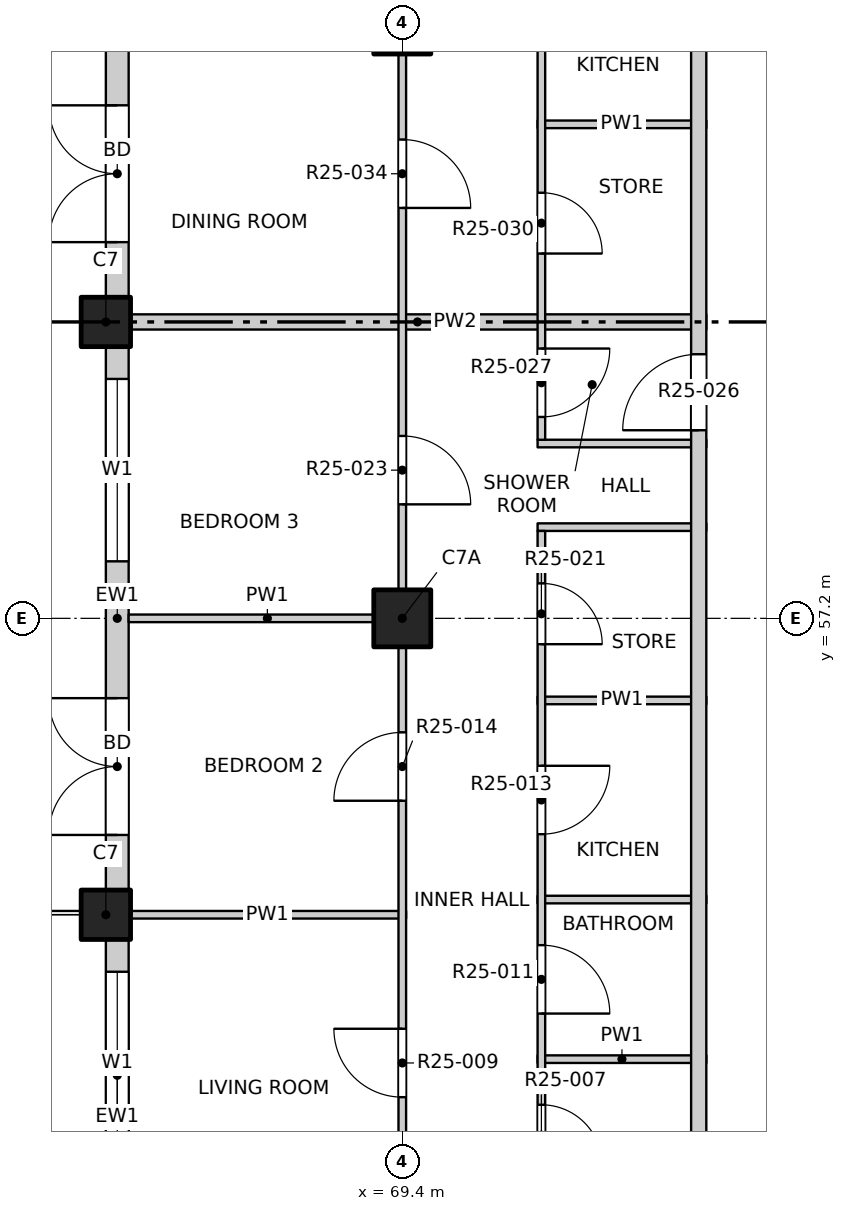
"""IFC4 building model, lengths in metres.
Left out: names, types, materials, properties, quantities, classifications, styles, units other than length and angle.
Written with IfcOpenShell. Run it as: python <this file> out.ifc"""

import sys

from ifc_helpers import new_model, si_unit, direction, frame, frame_2d, origin, origin_2d, place, context, subcontext, project, spatial, rectangle, extrude, element, fill, save


model = new_model("IFC4")
c1 = context("Model", 3, precision=1e-05, world=origin(), true_north=direction((0.0, 1.0)))
c2 = subcontext(c1, "Body", "Model", "MODEL_VIEW")
j1 = project(units=[si_unit("LENGTHUNIT", "METRE"), si_unit("PLANEANGLEUNIT", "RADIAN")], contexts=[c1])
p1 = place(None, origin())
s1 = spatial("IfcSite", under=j1, at=p1, CompositionType="ELEMENT")
p2 = place(p1, origin())
s2 = spatial("IfcBuilding", under=s1, at=p2, CompositionType="ELEMENT")
p3 = place(p2, frame((0.0, 0.0, 252.8)))
s3 = spatial("IfcBuildingStorey", under=s2, at=p3, CompositionType="ELEMENT", Elevation=252.8)
for number, where, z_axis, x_axis in (
    (1, (65.5, 53.3, -0.25), (0.0, 0.0, 1.0), (1.0, 0.0, 0.0)),
    (2, (65.5, 61.1, -0.25), (0.0, 0.0, 1.0), (1.0, 0.0, 0.0)),
):
    element("IfcColumn", number, at=place(p3, frame(where, z_axis=z_axis, x_axis=x_axis)), inside=s3, PredefinedType="COLUMN", context=c2, shape_type="SweptSolid", body=[
        extrude(rectangle(XDim=0.65, YDim=0.65, at=origin_2d()), origin(), (0.0, 0.0, 1.0), 3.4),
    ])
for number, where, z_axis, x_axis in (
    (3, (69.4, 57.2, -0.25), (0.0, 0.0, 1.0), (1.0, 0.0, 0.0)),
    (4, (69.4, 65.0, -0.25), (0.0, 0.0, 1.0), (1.0, 0.0, 0.0)),
):
    element("IfcColumn", number, at=place(p3, frame(where, z_axis=z_axis, x_axis=x_axis)), inside=s3, PredefinedType="COLUMN", context=c2, shape_type="SweptSolid", body=[
        extrude(rectangle(XDim=0.75, YDim=0.75, at=origin_2d()), origin(), (0.0, 0.0, 1.0), 3.4),
    ])
p4 = place(p3, frame((65.65, 49.4, 0.0), z_axis=(0.0, 0.0, 1.0), x_axis=(0.0, 1.0, 0.0)))
e5 = element("IfcWall", 5, at=p4, inside=s3, PredefinedType="SOLIDWALL", context=c2, shape_type="SweptSolid", body=[
    extrude(rectangle(XDim=3.575, YDim=0.3, at=frame_2d((1.788, 0.0))), origin(), (0.0, 0.0, 1.0), 2.7),
])
p5 = place(p4, frame((0.75, 0.0, 0.9)))
e6 = element("IfcOpeningElement", 6, at=p5, cuts=e5, PredefinedType="OPENING", context=c2, shape_type="SweptSolid", body=[
    extrude(rectangle(XDim=2.4, YDim=1.8, at=frame_2d((1.2, 0.9))), frame((0.0, 0.16, 0.0), z_axis=(0.0, -1.0, 0.0), x_axis=(1.0, 0.0, 0.0)), (0.0, 0.0, 1.0), 0.32),
])
p6 = place(p3, frame((65.65, 53.625, 0.0), z_axis=(0.0, 0.0, 1.0), x_axis=(0.0, 1.0, 0.0)))
e7 = element("IfcWall", 7, at=p6, inside=s3, PredefinedType="SOLIDWALL", context=c2, shape_type="SweptSolid", body=[
    extrude(rectangle(XDim=7.15, YDim=0.3, at=frame_2d((3.575, 0.0))), origin(), (0.0, 0.0, 1.0), 2.7),
])
p7 = place(p6, frame((0.725, 0.0, 0.0)))
e8 = element("IfcOpeningElement", 8, at=p7, cuts=e7, PredefinedType="OPENING", context=c2, shape_type="SweptSolid", body=[
    extrude(rectangle(XDim=1.8, YDim=2.4, at=frame_2d((0.9, 1.2))), frame((0.0, 0.16, 0.0), z_axis=(0.0, -1.0, 0.0), x_axis=(1.0, 0.0, 0.0)), (0.0, 0.0, 1.0), 0.32),
])
p8 = place(p6, frame((4.325, 0.0, 0.9)))
e9 = element("IfcOpeningElement", 9, at=p8, cuts=e7, PredefinedType="OPENING", context=c2, shape_type="SweptSolid", body=[
    extrude(rectangle(XDim=2.4, YDim=1.8, at=frame_2d((1.2, 0.9))), frame((0.0, 0.16, 0.0), z_axis=(0.0, -1.0, 0.0), x_axis=(1.0, 0.0, 0.0)), (0.0, 0.0, 1.0), 0.32),
])
p9 = place(p3, frame((65.65, 61.425, 0.0), z_axis=(0.0, 0.0, 1.0), x_axis=(0.0, 1.0, 0.0)))
e10 = element("IfcWall", 10, at=p9, inside=s3, PredefinedType="SOLIDWALL", context=c2, shape_type="SweptSolid", body=[
    extrude(rectangle(XDim=7.15, YDim=0.3, at=frame_2d((3.575, 0.0))), origin(), (0.0, 0.0, 1.0), 2.7),
])
p10 = place(p9, frame((0.725, 0.0, 0.0)))
e11 = element("IfcOpeningElement", 11, at=p10, cuts=e10, PredefinedType="OPENING", context=c2, shape_type="SweptSolid", body=[
    extrude(rectangle(XDim=1.8, YDim=2.4, at=frame_2d((0.9, 1.2))), frame((0.0, 0.16, 0.0), z_axis=(0.0, -1.0, 0.0), x_axis=(1.0, 0.0, 0.0)), (0.0, 0.0, 1.0), 0.32),
])
p11 = place(p9, frame((4.325, 0.0, 0.9)))
e12 = element("IfcOpeningElement", 12, at=p11, cuts=e10, PredefinedType="OPENING", context=c2, shape_type="SweptSolid", body=[
    extrude(rectangle(XDim=2.4, YDim=1.8, at=frame_2d((1.2, 0.9))), frame((0.0, 0.16, 0.0), z_axis=(0.0, -1.0, 0.0), x_axis=(1.0, 0.0, 0.0)), (0.0, 0.0, 1.0), 0.32),
])
p12 = place(p3, frame((71.18, 51.4, 0.0), z_axis=(0.0, 0.0, 1.0), x_axis=(1.0, 0.0, 0.0)))
e13 = element("IfcWall", 13, at=p12, inside=s3, PredefinedType="PARTITIONING", context=c2, shape_type="SweptSolid", body=[
    extrude(rectangle(XDim=2.22, YDim=0.1, at=frame_2d((1.11, 0.0))), origin(), (0.0, 0.0, 1.0), 3.15),
])
p13 = place(p3, frame((65.8, 53.3, 0.0), z_axis=(0.0, 0.0, 1.0), x_axis=(1.0, 0.0, 0.0)))
e14 = element("IfcWall", 14, at=p13, inside=s3, PredefinedType="PARTITIONING", context=c2, shape_type="SweptSolid", body=[
    extrude(rectangle(XDim=3.65, YDim=0.1, at=frame_2d((1.825, 0.0))), origin(), (0.0, 0.0, 1.0), 3.15),
])
for number, where, z_axis, x_axis in (
    (15, (71.18, 53.5, 0.0), (0.0, 0.0, 1.0), (1.0, 0.0, 0.0)),
    (16, (71.18, 56.12, 0.0), (0.0, 0.0, 1.0), (1.0, 0.0, 0.0)),
):
    element("IfcWall", number, at=place(p3, frame(where, z_axis=z_axis, x_axis=x_axis)), inside=s3, PredefinedType="PARTITIONING", context=c2, shape_type="SweptSolid", body=[
        extrude(rectangle(XDim=2.22, YDim=0.1, at=frame_2d((1.11, 0.0))), origin(), (0.0, 0.0, 1.0), 3.15),
    ])
p14 = place(p3, frame((65.8, 57.2, 0.0), z_axis=(0.0, 0.0, 1.0), x_axis=(1.0, 0.0, 0.0)))
e17 = element("IfcWall", 17, at=p14, inside=s3, PredefinedType="PARTITIONING", context=c2, shape_type="SweptSolid", body=[
    extrude(rectangle(XDim=3.65, YDim=0.1, at=frame_2d((1.825, 0.0))), origin(), (0.0, 0.0, 1.0), 3.15),
])
for number, where, z_axis, x_axis in (
    (18, (71.18, 58.4, 0.0), (0.0, 0.0, 1.0), (1.0, 0.0, 0.0)),
    (19, (71.18, 59.5, 0.0), (0.0, 0.0, 1.0), (1.0, 0.0, 0.0)),
):
    element("IfcWall", number, at=place(p3, frame(where, z_axis=z_axis, x_axis=x_axis)), inside=s3, PredefinedType="PARTITIONING", context=c2, shape_type="SweptSolid", body=[
        extrude(rectangle(XDim=2.22, YDim=0.1, at=frame_2d((1.11, 0.0))), origin(), (0.0, 0.0, 1.0), 3.15),
    ])
p15 = place(p3, frame((65.8, 61.1, 0.0), z_axis=(0.0, 0.0, 1.0), x_axis=(1.0, 0.0, 0.0)))
e20 = element("IfcWall", 20, at=p15, inside=s3, PredefinedType="PARTITIONING", context=c2, shape_type="SweptSolid", body=[
    extrude(rectangle(XDim=7.6, YDim=0.2, at=frame_2d((3.8, 0.0))), origin(), (0.0, 0.0, 1.0), 2.55),
])
p16 = place(p3, frame((71.18, 63.7, 0.0), z_axis=(0.0, 0.0, 1.0), x_axis=(1.0, 0.0, 0.0)))
e21 = element("IfcWall", 21, at=p16, inside=s3, PredefinedType="PARTITIONING", context=c2, shape_type="SweptSolid", body=[
    extrude(rectangle(XDim=2.22, YDim=0.1, at=frame_2d((1.11, 0.0))), origin(), (0.0, 0.0, 1.0), 3.15),
])
p17 = place(p3, frame((69.4, 45.8, 0.0), z_axis=(0.0, 0.0, 1.0), x_axis=(0.0, 1.0, 0.0)))
e22 = element("IfcWall", 22, at=p17, inside=s3, PredefinedType="PARTITIONING", context=c2, shape_type="SweptSolid", body=[
    extrude(rectangle(XDim=38.4, YDim=0.1, at=frame_2d((19.2, 0.0))), origin(), (0.0, 0.0, 1.0), 3.15),
])
p18 = place(p17, frame((1.05, 0.0, 0.0)))
e23 = element("IfcOpeningElement", 23, at=p18, cuts=e22, PredefinedType="OPENING", context=c2, shape_type="SweptSolid", body=[
    extrude(rectangle(XDim=1.2, YDim=2.1, at=frame_2d((0.6, 1.05))), frame((0.0, 0.06, 0.0), z_axis=(0.0, -1.0, 0.0), x_axis=(1.0, 0.0, 0.0)), (0.0, 0.0, 1.0), 0.12),
])
p19 = place(p17, frame((5.1, 0.0, 0.0)))
e24 = element("IfcOpeningElement", 24, at=p19, cuts=e22, PredefinedType="OPENING", context=c2, shape_type="SweptSolid", body=[
    extrude(rectangle(XDim=0.9, YDim=2.1, at=frame_2d((0.45, 1.05))), frame((0.0, 0.06, 0.0), z_axis=(0.0, -1.0, 0.0), x_axis=(1.0, 0.0, 0.0)), (0.0, 0.0, 1.0), 0.12),
])
p20 = place(p17, frame((9.0, 0.0, 0.0)))
e25 = element("IfcOpeningElement", 25, at=p20, cuts=e22, PredefinedType="OPENING", context=c2, shape_type="SweptSolid", body=[
    extrude(rectangle(XDim=0.9, YDim=2.1, at=frame_2d((0.45, 1.05))), frame((0.0, 0.06, 0.0), z_axis=(0.0, -1.0, 0.0), x_axis=(1.0, 0.0, 0.0)), (0.0, 0.0, 1.0), 0.12),
])
p21 = place(p17, frame((12.9, 0.0, 0.0)))
e26 = element("IfcOpeningElement", 26, at=p21, cuts=e22, PredefinedType="OPENING", context=c2, shape_type="SweptSolid", body=[
    extrude(rectangle(XDim=0.9, YDim=2.1, at=frame_2d((0.45, 1.05))), frame((0.0, 0.06, 0.0), z_axis=(0.0, -1.0, 0.0), x_axis=(1.0, 0.0, 0.0)), (0.0, 0.0, 1.0), 0.12),
])
p22 = place(p17, frame((16.8, 0.0, 0.0)))
e27 = element("IfcOpeningElement", 27, at=p22, cuts=e22, PredefinedType="OPENING", context=c2, shape_type="SweptSolid", body=[
    extrude(rectangle(XDim=0.9, YDim=2.1, at=frame_2d((0.45, 1.05))), frame((0.0, 0.06, 0.0), z_axis=(0.0, -1.0, 0.0), x_axis=(1.0, 0.0, 0.0)), (0.0, 0.0, 1.0), 0.12),
])
p23 = place(p17, frame((20.7, 0.0, 0.0)))
e28 = element("IfcOpeningElement", 28, at=p23, cuts=e22, PredefinedType="OPENING", context=c2, shape_type="SweptSolid", body=[
    extrude(rectangle(XDim=0.9, YDim=2.1, at=frame_2d((0.45, 1.05))), frame((0.0, 0.06, 0.0), z_axis=(0.0, -1.0, 0.0), x_axis=(1.0, 0.0, 0.0)), (0.0, 0.0, 1.0), 0.12),
])
p24 = place(p17, frame((24.6, 0.0, 0.0)))
e29 = element("IfcOpeningElement", 29, at=p24, cuts=e22, PredefinedType="OPENING", context=c2, shape_type="SweptSolid", body=[
    extrude(rectangle(XDim=0.9, YDim=2.1, at=frame_2d((0.45, 1.05))), frame((0.0, 0.06, 0.0), z_axis=(0.0, -1.0, 0.0), x_axis=(1.0, 0.0, 0.0)), (0.0, 0.0, 1.0), 0.12),
])
p25 = place(p17, frame((28.5, 0.0, 0.0)))
e30 = element("IfcOpeningElement", 30, at=p25, cuts=e22, PredefinedType="OPENING", context=c2, shape_type="SweptSolid", body=[
    extrude(rectangle(XDim=0.9, YDim=2.1, at=frame_2d((0.45, 1.05))), frame((0.0, 0.06, 0.0), z_axis=(0.0, -1.0, 0.0), x_axis=(1.0, 0.0, 0.0)), (0.0, 0.0, 1.0), 0.12),
])
p26 = place(p17, frame((32.4, 0.0, 0.0)))
e31 = element("IfcOpeningElement", 31, at=p26, cuts=e22, PredefinedType="OPENING", context=c2, shape_type="SweptSolid", body=[
    extrude(rectangle(XDim=0.9, YDim=2.1, at=frame_2d((0.45, 1.05))), frame((0.0, 0.06, 0.0), z_axis=(0.0, -1.0, 0.0), x_axis=(1.0, 0.0, 0.0)), (0.0, 0.0, 1.0), 0.12),
])
p27 = place(p17, frame((36.15, 0.0, 0.0)))
e32 = element("IfcOpeningElement", 32, at=p27, cuts=e22, PredefinedType="OPENING", context=c2, shape_type="SweptSolid", body=[
    extrude(rectangle(XDim=1.2, YDim=2.1, at=frame_2d((0.6, 1.05))), frame((0.0, 0.06, 0.0), z_axis=(0.0, -1.0, 0.0), x_axis=(1.0, 0.0, 0.0)), (0.0, 0.0, 1.0), 0.12),
])
p28 = place(p3, frame((71.23, 49.45, 0.0), z_axis=(0.0, 0.0, 1.0), x_axis=(0.0, 1.0, 0.0)))
e33 = element("IfcWall", 33, at=p28, inside=s3, PredefinedType="PARTITIONING", context=c2, shape_type="SweptSolid", body=[
    extrude(rectangle(XDim=8.9, YDim=0.1, at=frame_2d((4.45, 0.0))), origin(), (0.0, 0.0, 1.0), 3.15),
])
p29 = place(p28, frame((0.55, 0.0, 0.0)))
e34 = element("IfcOpeningElement", 34, at=p29, cuts=e33, PredefinedType="OPENING", context=c2, shape_type="SweptSolid", body=[
    extrude(rectangle(XDim=0.8, YDim=2.1, at=frame_2d((0.4, 1.05))), frame((0.0, 0.06, 0.0), z_axis=(0.0, -1.0, 0.0), x_axis=(1.0, 0.0, 0.0)), (0.0, 0.0, 1.0), 0.12),
])
p30 = place(p28, frame((2.55, 0.0, 0.0)))
e35 = element("IfcOpeningElement", 35, at=p30, cuts=e33, PredefinedType="OPENING", context=c2, shape_type="SweptSolid", body=[
    extrude(rectangle(XDim=0.9, YDim=2.1, at=frame_2d((0.45, 1.05))), frame((0.0, 0.06, 0.0), z_axis=(0.0, -1.0, 0.0), x_axis=(1.0, 0.0, 0.0)), (0.0, 0.0, 1.0), 0.12),
])
p31 = place(p28, frame((4.91, 0.0, 0.0)))
e36 = element("IfcOpeningElement", 36, at=p31, cuts=e33, PredefinedType="OPENING", context=c2, shape_type="SweptSolid", body=[
    extrude(rectangle(XDim=0.9, YDim=2.1, at=frame_2d((0.45, 1.05))), frame((0.0, 0.06, 0.0), z_axis=(0.0, -1.0, 0.0), x_axis=(1.0, 0.0, 0.0)), (0.0, 0.0, 1.0), 0.12),
])
p32 = place(p28, frame((7.41, 0.0, 0.0)))
e37 = element("IfcOpeningElement", 37, at=p32, cuts=e33, PredefinedType="OPENING", context=c2, shape_type="SweptSolid", body=[
    extrude(rectangle(XDim=0.8, YDim=2.1, at=frame_2d((0.4, 1.05))), frame((0.0, 0.06, 0.0), z_axis=(0.0, -1.0, 0.0), x_axis=(1.0, 0.0, 0.0)), (0.0, 0.0, 1.0), 0.12),
])
p33 = place(p3, frame((71.23, 59.55, 0.0), z_axis=(0.0, 0.0, 1.0), x_axis=(0.0, 1.0, 0.0)))
e38 = element("IfcWall", 38, at=p33, inside=s3, PredefinedType="PARTITIONING", context=c2, shape_type="SweptSolid", body=[
    extrude(rectangle(XDim=10.1, YDim=0.1, at=frame_2d((5.05, 0.0))), origin(), (0.0, 0.0, 1.0), 3.15),
])
p34 = place(p33, frame((0.3, 0.0, 0.0)))
e39 = element("IfcOpeningElement", 39, at=p34, cuts=e38, PredefinedType="OPENING", context=c2, shape_type="SweptSolid", body=[
    extrude(rectangle(XDim=0.9, YDim=2.1, at=frame_2d((0.45, 1.05))), frame((0.0, 0.06, 0.0), z_axis=(0.0, -1.0, 0.0), x_axis=(1.0, 0.0, 0.0)), (0.0, 0.0, 1.0), 0.12),
])
p35 = place(p33, frame((2.45, 0.0, 0.0)))
e40 = element("IfcOpeningElement", 40, at=p35, cuts=e38, PredefinedType="OPENING", context=c2, shape_type="SweptSolid", body=[
    extrude(rectangle(XDim=0.8, YDim=2.1, at=frame_2d((0.4, 1.05))), frame((0.0, 0.06, 0.0), z_axis=(0.0, -1.0, 0.0), x_axis=(1.0, 0.0, 0.0)), (0.0, 0.0, 1.0), 0.12),
])
p36 = place(p33, frame((5.31, 0.0, 0.0)))
e41 = element("IfcOpeningElement", 41, at=p36, cuts=e38, PredefinedType="OPENING", context=c2, shape_type="SweptSolid", body=[
    extrude(rectangle(XDim=0.9, YDim=2.1, at=frame_2d((0.45, 1.05))), frame((0.0, 0.06, 0.0), z_axis=(0.0, -1.0, 0.0), x_axis=(1.0, 0.0, 0.0)), (0.0, 0.0, 1.0), 0.12),
])
p37 = place(p33, frame((8.36, 0.0, 0.0)))
e42 = element("IfcOpeningElement", 42, at=p37, cuts=e38, PredefinedType="OPENING", context=c2, shape_type="SweptSolid", body=[
    extrude(rectangle(XDim=0.8, YDim=2.1, at=frame_2d((0.4, 1.05))), frame((0.0, 0.06, 0.0), z_axis=(0.0, -1.0, 0.0), x_axis=(1.0, 0.0, 0.0)), (0.0, 0.0, 1.0), 0.12),
])
p38 = place(p3, frame((73.3, 49.5, 0.0), z_axis=(0.0, 0.0, 1.0), x_axis=(0.0, 1.0, 0.0)))
e43 = element("IfcWall", 43, at=p38, inside=s3, PredefinedType="PARTITIONING", context=c2, shape_type="SweptSolid", body=[
    extrude(rectangle(XDim=34.7, YDim=0.2, at=frame_2d((17.35, 0.0))), origin(), (0.0, 0.0, 1.0), 3.15),
])
p39 = place(p38, frame((10.175, 0.0, 0.0)))
e44 = element("IfcOpeningElement", 44, at=p39, cuts=e43, PredefinedType="OPENING", context=c2, shape_type="SweptSolid", body=[
    extrude(rectangle(XDim=1.0, YDim=2.1, at=frame_2d((0.5, 1.05))), frame((0.0, 0.11, 0.0), z_axis=(0.0, -1.0, 0.0), x_axis=(1.0, 0.0, 0.0)), (0.0, 0.0, 1.0), 0.22),
])
p40 = place(p38, frame((21.475, 0.0, 0.0)))
e45 = element("IfcOpeningElement", 45, at=p40, cuts=e43, PredefinedType="OPENING", context=c2, shape_type="SweptSolid", body=[
    extrude(rectangle(XDim=1.0, YDim=2.1, at=frame_2d((0.5, 1.05))), frame((0.0, 0.11, 0.0), z_axis=(0.0, -1.0, 0.0), x_axis=(1.0, 0.0, 0.0)), (0.0, 0.0, 1.0), 0.22),
])
p41 = place(p38, frame((29.875, 0.0, 0.0)))
e46 = element("IfcOpeningElement", 46, at=p41, cuts=e43, PredefinedType="OPENING", context=c2, shape_type="SweptSolid", body=[
    extrude(rectangle(XDim=1.0, YDim=2.1, at=frame_2d((0.5, 1.05))), frame((0.0, 0.11, 0.0), z_axis=(0.0, -1.0, 0.0), x_axis=(1.0, 0.0, 0.0)), (0.0, 0.0, 1.0), 0.22),
])
p42 = place(p5, origin())
e47 = element("IfcWindow", 47, at=p42, inside=s3, PartitioningType="DOUBLE_PANEL_VERTICAL", PredefinedType="WINDOW", context=c2, shape_type="SweptSolid", body=[
    extrude(rectangle(XDim=2.4, YDim=1.8, at=frame_2d((1.2, 0.9))), frame((0.0, 0.03, 0.0), z_axis=(0.0, -1.0, 0.0), x_axis=(1.0, 0.0, 0.0)), (0.0, 0.0, 1.0), 0.06),
])
fill(e6, e47)
p43 = place(p7, origin())
e48 = element("IfcDoor", 48, at=p43, inside=s3, OperationType="DOUBLE_DOOR_SINGLE_SWING", PredefinedType="DOOR", context=c2, shape_type="SweptSolid", body=[
    extrude(rectangle(XDim=1.8, YDim=2.4, at=frame_2d((0.9, 1.2))), frame((0.0, 0.025, 0.0), z_axis=(0.0, -1.0, 0.0), x_axis=(1.0, 0.0, 0.0)), (0.0, 0.0, 1.0), 0.05),
])
fill(e8, e48)
p44 = place(p8, origin())
e49 = element("IfcWindow", 49, at=p44, inside=s3, PartitioningType="DOUBLE_PANEL_VERTICAL", PredefinedType="WINDOW", context=c2, shape_type="SweptSolid", body=[
    extrude(rectangle(XDim=2.4, YDim=1.8, at=frame_2d((1.2, 0.9))), frame((0.0, 0.03, 0.0), z_axis=(0.0, -1.0, 0.0), x_axis=(1.0, 0.0, 0.0)), (0.0, 0.0, 1.0), 0.06),
])
fill(e9, e49)
p45 = place(p10, origin())
e50 = element("IfcDoor", 50, at=p45, inside=s3, OperationType="DOUBLE_DOOR_SINGLE_SWING", PredefinedType="DOOR", context=c2, shape_type="SweptSolid", body=[
    extrude(rectangle(XDim=1.8, YDim=2.4, at=frame_2d((0.9, 1.2))), frame((0.0, 0.025, 0.0), z_axis=(0.0, -1.0, 0.0), x_axis=(1.0, 0.0, 0.0)), (0.0, 0.0, 1.0), 0.05),
])
fill(e11, e50)
p46 = place(p29, origin())
e51 = element("IfcDoor", 51, at=p46, inside=s3, OperationType="SINGLE_SWING_RIGHT", PredefinedType="DOOR", context=c2, shape_type="SweptSolid", body=[
    extrude(rectangle(XDim=0.8, YDim=2.1, at=frame_2d((0.4, 1.05))), frame((0.0, 0.025, 0.0), z_axis=(0.0, -1.0, 0.0), x_axis=(1.0, 0.0, 0.0)), (0.0, 0.0, 1.0), 0.05),
])
fill(e34, e51)
p47 = place(p19, origin())
e52 = element("IfcDoor", 52, at=p47, inside=s3, OperationType="SINGLE_SWING_RIGHT", PredefinedType="DOOR", context=c2, shape_type="SweptSolid", body=[
    extrude(rectangle(XDim=0.9, YDim=2.1, at=frame_2d((0.45, 1.05))), frame((0.0, 0.025, 0.0), z_axis=(0.0, -1.0, 0.0), x_axis=(1.0, 0.0, 0.0)), (0.0, 0.0, 1.0), 0.05),
])
fill(e24, e52)
p48 = place(p30, origin())
e53 = element("IfcDoor", 53, at=p48, inside=s3, OperationType="SINGLE_SWING_RIGHT", PredefinedType="DOOR", context=c2, shape_type="SweptSolid", body=[
    extrude(rectangle(XDim=0.9, YDim=2.1, at=frame_2d((0.45, 1.05))), frame((0.0, 0.025, 0.0), z_axis=(0.0, -1.0, 0.0), x_axis=(1.0, 0.0, 0.0)), (0.0, 0.0, 1.0), 0.05),
])
fill(e35, e53)
p49 = place(p31, origin())
e54 = element("IfcDoor", 54, at=p49, inside=s3, OperationType="SINGLE_SWING_LEFT", PredefinedType="DOOR", context=c2, shape_type="SweptSolid", body=[
    extrude(rectangle(XDim=0.9, YDim=2.1, at=frame_2d((0.45, 1.05))), frame((0.0, 0.025, 0.0), z_axis=(0.0, -1.0, 0.0), x_axis=(1.0, 0.0, 0.0)), (0.0, 0.0, 1.0), 0.05),
])
fill(e36, e54)
p50 = place(p20, origin())
e55 = element("IfcDoor", 55, at=p50, inside=s3, OperationType="SINGLE_SWING_LEFT", PredefinedType="DOOR", context=c2, shape_type="SweptSolid", body=[
    extrude(rectangle(XDim=0.9, YDim=2.1, at=frame_2d((0.45, 1.05))), frame((0.0, 0.025, 0.0), z_axis=(0.0, -1.0, 0.0), x_axis=(1.0, 0.0, 0.0)), (0.0, 0.0, 1.0), 0.05),
])
fill(e25, e55)
p51 = place(p32, origin())
e56 = element("IfcDoor", 56, at=p51, inside=s3, OperationType="SINGLE_SWING_RIGHT", PredefinedType="DOOR", context=c2, shape_type="SweptSolid", body=[
    extrude(rectangle(XDim=0.8, YDim=2.1, at=frame_2d((0.4, 1.05))), frame((0.0, 0.025, 0.0), z_axis=(0.0, -1.0, 0.0), x_axis=(1.0, 0.0, 0.0)), (0.0, 0.0, 1.0), 0.05),
])
fill(e37, e56)
p52 = place(p21, origin())
e57 = element("IfcDoor", 57, at=p52, inside=s3, OperationType="SINGLE_SWING_RIGHT", PredefinedType="DOOR", context=c2, shape_type="SweptSolid", body=[
    extrude(rectangle(XDim=0.9, YDim=2.1, at=frame_2d((0.45, 1.05))), frame((0.0, 0.025, 0.0), z_axis=(0.0, -1.0, 0.0), x_axis=(1.0, 0.0, 0.0)), (0.0, 0.0, 1.0), 0.05),
])
fill(e26, e57)
p53 = place(p39, origin())
e58 = element("IfcDoor", 58, at=p53, inside=s3, OperationType="SINGLE_SWING_RIGHT", PredefinedType="DOOR", context=c2, shape_type="SweptSolid", body=[
    extrude(rectangle(XDim=1.0, YDim=2.1, at=frame_2d((0.5, 1.05))), frame((0.0, 0.025, 0.0), z_axis=(0.0, -1.0, 0.0), x_axis=(1.0, 0.0, 0.0)), (0.0, 0.0, 1.0), 0.05),
])
fill(e44, e58)
p54 = place(p34, origin())
e59 = element("IfcDoor", 59, at=p54, inside=s3, OperationType="SINGLE_SWING_LEFT", PredefinedType="DOOR", context=c2, shape_type="SweptSolid", body=[
    extrude(rectangle(XDim=0.9, YDim=2.1, at=frame_2d((0.45, 1.05))), frame((0.0, 0.025, 0.0), z_axis=(0.0, -1.0, 0.0), x_axis=(1.0, 0.0, 0.0)), (0.0, 0.0, 1.0), 0.05),
])
fill(e39, e59)
p55 = place(p35, origin())
e60 = element("IfcDoor", 60, at=p55, inside=s3, OperationType="SINGLE_SWING_RIGHT", PredefinedType="DOOR", context=c2, shape_type="SweptSolid", body=[
    extrude(rectangle(XDim=0.8, YDim=2.1, at=frame_2d((0.4, 1.05))), frame((0.0, 0.025, 0.0), z_axis=(0.0, -1.0, 0.0), x_axis=(1.0, 0.0, 0.0)), (0.0, 0.0, 1.0), 0.05),
])
fill(e40, e60)
p56 = place(p22, origin())
e61 = element("IfcDoor", 61, at=p56, inside=s3, OperationType="SINGLE_SWING_RIGHT", PredefinedType="DOOR", context=c2, shape_type="SweptSolid", body=[
    extrude(rectangle(XDim=0.9, YDim=2.1, at=frame_2d((0.45, 1.05))), frame((0.0, 0.025, 0.0), z_axis=(0.0, -1.0, 0.0), x_axis=(1.0, 0.0, 0.0)), (0.0, 0.0, 1.0), 0.05),
])
fill(e27, e61)
save(model, sys.argv[1])
